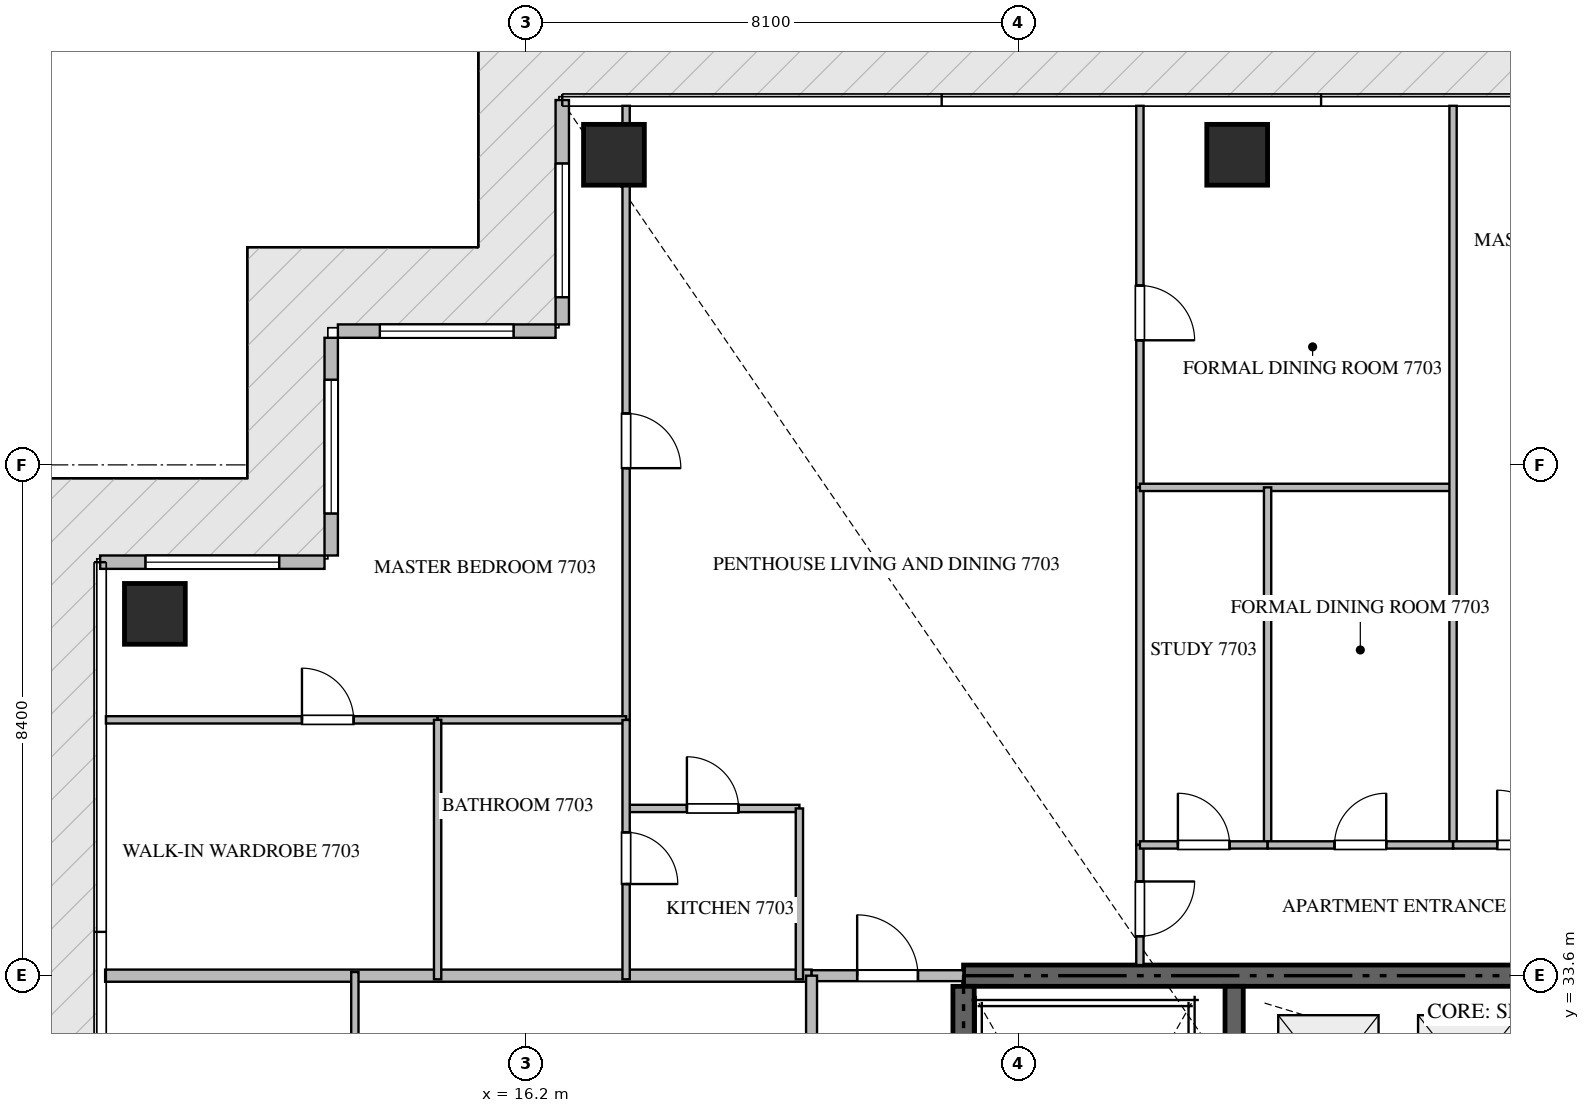
"""IFC4 building model, lengths in metres.
Left out: names, types, materials, properties, quantities, classifications, styles, units other than length and angle.
Written with IfcOpenShell. Run it as: python <this file> out.ifc"""

import sys

from ifc_helpers import new_model, si_unit, direction, frame, frame_2d, origin, origin_2d, place, context, subcontext, project, spatial, rectangle, extrude, source, transform, mapped, element, fill, save


model = new_model("IFC4")
c1 = context("Model", 3, precision=1e-05, world=origin(), true_north=direction((0.0, 1.0)))
c2 = subcontext(c1, "Body", "Model", "MODEL_VIEW")
j1 = project(units=[si_unit("LENGTHUNIT", "METRE"), si_unit("PLANEANGLEUNIT", "RADIAN")], contexts=[c1])
p1 = place(None, origin())
s1 = spatial("IfcSite", under=j1, at=p1, CompositionType="ELEMENT")
p2 = place(p1, origin())
s2 = spatial("IfcBuilding", under=s1, at=p2, CompositionType="ELEMENT")
p3 = place(p2, frame((0.0, 0.0, 309.65)))
s3 = spatial("IfcBuildingStorey", under=s2, at=p3, CompositionType="ELEMENT", Elevation=309.65)
p4 = place(p3, frame((41.4, 33.6, -0.26), z_axis=(0.0, 0.0, 1.0), x_axis=(-1.0, 0.0, 0.0)))
e1 = element("IfcWall", 1, at=p4, inside=s3, PredefinedType="SHEAR", context=c2, shape_type="SweptSolid", body=[
    extrude(rectangle(XDim=18.0, YDim=0.35, at=frame_2d((9.0, 0.0))), origin(), (0.0, 0.0, 1.0), 4.048),
])
p5 = place(p3, frame((23.4, 24.25, -0.26), z_axis=(0.0, 0.0, 1.0), x_axis=(0.0, 1.0, 0.0)))
e2 = element("IfcWall", 2, at=p5, inside=s3, PredefinedType="SHEAR", context=c2, shape_type="SweptSolid", body=[
    extrude(rectangle(XDim=9.175, YDim=0.35, at=frame_2d((4.587, 0.0))), origin(), (0.0, 0.0, 1.0), 4.048),
])
p6 = place(p3, frame((27.85, 23.55, -0.26), z_axis=(0.0, 0.0, 1.0), x_axis=(0.0, 1.0, 0.0)))
e3 = element("IfcWall", 3, at=p6, inside=s3, PredefinedType="SHEAR", context=c2, shape_type="SweptSolid", body=[
    extrude(rectangle(XDim=9.875, YDim=0.3, at=frame_2d((4.938, 0.0))), origin(), (0.0, 0.0, 1.0), 4.048),
])
m1 = source(origin(), c2, "Body", "SweptSolid", [
    extrude(rectangle(XDim=1.0, YDim=1.0, at=origin_2d()), origin(), (0.0, 0.0, 1.0), 4.05),
])
for number, where, z_axis, x_axis in (
    (4, (17.65, 47.1, -0.26), (0.0, 0.0, 1.0), (1.0, 0.0, 0.0)),
    (5, (27.9, 47.1, -0.26), (0.0, 0.0, 1.0), (1.0, 0.0, 0.0)),
    (6, (10.1, 39.55, -0.26), (0.0, 0.0, 1.0), (1.0, 0.0, 0.0)),
):
    element("IfcColumn", number, at=place(p3, frame(where, z_axis=z_axis, x_axis=x_axis)), inside=s3, PredefinedType="COLUMN", context=c2, shape_type="MappedRepresentation", body=[
        mapped(m1, transform((0.0, 0.0, 0.0), scale=1.0)),
    ])
p7 = place(p3, frame((16.8, 48.0, 0.0), z_axis=(0.0, 0.0, 1.0), x_axis=(0.0, -1.0, 0.0)))
e7 = element("IfcWall", 7, at=p7, inside=s3, PredefinedType="ELEMENTEDWALL", context=c2, shape_type="SweptSolid", body=[
    extrude(rectangle(XDim=3.69, YDim=0.22, at=frame_2d((1.845, 0.0))), origin(), (0.0, 0.0, 1.0), 3.775),
])
p8 = place(p7, frame((1.043, 0.0, 0.65)))
e8 = element("IfcOpeningElement", 8, at=p8, cuts=e7, PredefinedType="OPENING", context=c2, shape_type="SweptSolid", body=[
    extrude(rectangle(XDim=2.2, YDim=2.4, at=frame_2d((1.1, 1.2))), frame((0.0, 0.12, 0.0), z_axis=(0.0, -1.0, 0.0), x_axis=(1.0, 0.0, 0.0)), (0.0, 0.0, 1.0), 0.24),
])
p9 = place(p3, frame((16.69, 44.2, 0.0), z_axis=(0.0, 0.0, 1.0), x_axis=(-1.0, 0.0, 0.0)))
e9 = element("IfcWall", 9, at=p9, inside=s3, PredefinedType="ELEMENTEDWALL", context=c2, shape_type="SweptSolid", body=[
    extrude(rectangle(XDim=3.58, YDim=0.22, at=frame_2d((1.79, 0.0))), origin(), (0.0, 0.0, 1.0), 3.775),
])
p10 = place(p9, frame((0.69, 0.0, 0.65)))
e10 = element("IfcOpeningElement", 10, at=p10, cuts=e9, PredefinedType="OPENING", context=c2, shape_type="SweptSolid", body=[
    extrude(rectangle(XDim=2.2, YDim=2.4, at=frame_2d((1.1, 1.2))), frame((0.0, 0.12, 0.0), z_axis=(0.0, -1.0, 0.0), x_axis=(1.0, 0.0, 0.0)), (0.0, 0.0, 1.0), 0.24),
])
p11 = place(p3, frame((13.0, 44.09, 0.0), z_axis=(0.0, 0.0, 1.0), x_axis=(0.0, -1.0, 0.0)))
e11 = element("IfcWall", 11, at=p11, inside=s3, PredefinedType="ELEMENTEDWALL", context=c2, shape_type="SweptSolid", body=[
    extrude(rectangle(XDim=3.58, YDim=0.22, at=frame_2d((1.79, 0.0))), origin(), (0.0, 0.0, 1.0), 3.775),
])
p12 = place(p11, frame((0.69, 0.0, 0.65)))
e12 = element("IfcOpeningElement", 12, at=p12, cuts=e11, PredefinedType="OPENING", context=c2, shape_type="SweptSolid", body=[
    extrude(rectangle(XDim=2.2, YDim=2.4, at=frame_2d((1.1, 1.2))), frame((0.0, 0.12, 0.0), z_axis=(0.0, -1.0, 0.0), x_axis=(1.0, 0.0, 0.0)), (0.0, 0.0, 1.0), 0.24),
])
p13 = place(p3, frame((12.89, 40.4, 0.0), z_axis=(0.0, 0.0, 1.0), x_axis=(-1.0, 0.0, 0.0)))
e13 = element("IfcWall", 13, at=p13, inside=s3, PredefinedType="ELEMENTEDWALL", context=c2, shape_type="SweptSolid", body=[
    extrude(rectangle(XDim=3.69, YDim=0.22, at=frame_2d((1.845, 0.0))), origin(), (0.0, 0.0, 1.0), 3.775),
])
p14 = place(p13, frame((0.745, 0.0, 0.65)))
e14 = element("IfcOpeningElement", 14, at=p14, cuts=e13, PredefinedType="OPENING", context=c2, shape_type="SweptSolid", body=[
    extrude(rectangle(XDim=2.2, YDim=2.4, at=frame_2d((1.1, 1.2))), frame((0.0, 0.12, 0.0), z_axis=(0.0, -1.0, 0.0), x_axis=(1.0, 0.0, 0.0)), (0.0, 0.0, 1.0), 0.24),
])
p15 = place(p3, frame((9.282, 33.6, 0.0), z_axis=(0.0, 0.0, 1.0), x_axis=(1.0, 0.0, 0.0)))
e15 = element("IfcWall", 15, at=p15, inside=s3, PredefinedType="PARTITIONING", context=c2, shape_type="SweptSolid", body=[
    extrude(rectangle(XDim=11.618, YDim=0.2, at=frame_2d((5.809, 0.0))), origin(), (0.0, 0.0, 1.0), 3.79),
])
p16 = place(p3, frame((20.902, 33.6, 0.0), z_axis=(0.0, 0.0, 1.0), x_axis=(1.0, 0.0, 0.0)))
e16 = element("IfcWall", 16, at=p16, inside=s3, PredefinedType="PARTITIONING", context=c2, shape_type="SweptSolid", body=[
    extrude(rectangle(XDim=2.496, YDim=0.18, at=frame_2d((1.248, 0.0))), origin(), (0.0, 0.0, 1.0), 3.79),
])
p17 = place(p16, frame((0.748, 0.0, 0.0)))
e17 = element("IfcOpeningElement", 17, at=p17, cuts=e16, PredefinedType="OPENING", context=c2, shape_type="SweptSolid", body=[
    extrude(rectangle(XDim=1.0, YDim=2.15, at=frame_2d((0.5, 1.075))), frame((0.0, 0.1, 0.0), z_axis=(0.0, -1.0, 0.0), x_axis=(1.0, 0.0, 0.0)), (0.0, 0.0, 1.0), 0.2),
])
p18 = place(p3, frame((20.9, 16.8, 0.0), z_axis=(0.0, 0.0, 1.0), x_axis=(0.0, 1.0, 0.0)))
e18 = element("IfcWall", 18, at=p18, inside=s3, PredefinedType="PARTITIONING", context=c2, shape_type="SweptSolid", body=[
    extrude(rectangle(XDim=16.8, YDim=0.18, at=frame_2d((8.4, 0.0))), origin(), (0.0, 0.0, 1.0), 3.79),
])
p19 = place(p18, frame((1.3, 0.0, 0.0)))
e19 = element("IfcOpeningElement", 19, at=p19, cuts=e18, PredefinedType="OPENING", context=c2, shape_type="SweptSolid", body=[
    extrude(rectangle(XDim=1.0, YDim=2.15, at=frame_2d((0.5, 1.075))), frame((0.0, 0.1, 0.0), z_axis=(0.0, -1.0, 0.0), x_axis=(1.0, 0.0, 0.0)), (0.0, 0.0, 1.0), 0.2),
])
p20 = place(p3, frame((17.85, 36.35, 0.0), z_axis=(0.0, 0.0, 1.0), x_axis=(1.0, 0.0, 0.0)))
e20 = element("IfcWall", 20, at=p20, inside=s3, PredefinedType="PARTITIONING", context=c2, shape_type="SweptSolid", body=[
    extrude(rectangle(XDim=2.85, YDim=0.12, at=frame_2d((1.425, 0.0))), origin(), (0.0, 0.0, 1.0), 3.79),
])
p21 = place(p20, frame((1.0, 0.0, 0.0)))
e21 = element("IfcOpeningElement", 21, at=p21, cuts=e20, PredefinedType="OPENING", context=c2, shape_type="SweptSolid", body=[
    extrude(rectangle(XDim=0.85, YDim=2.1, at=frame_2d((0.425, 1.05))), frame((0.0, 0.07, 0.0), z_axis=(0.0, -1.0, 0.0), x_axis=(1.0, 0.0, 0.0)), (0.0, 0.0, 1.0), 0.14),
])
p22 = place(p3, frame((20.7, 36.35, 0.0), z_axis=(0.0, 0.0, 1.0), x_axis=(0.0, -1.0, 0.0)))
e22 = element("IfcWall", 22, at=p22, inside=s3, PredefinedType="PARTITIONING", context=c2, shape_type="SweptSolid", body=[
    extrude(rectangle(XDim=2.81, YDim=0.12, at=frame_2d((1.405, 0.0))), origin(), (0.0, 0.0, 1.0), 3.79),
])
p23 = place(p3, frame((17.85, 47.905, 0.0), z_axis=(0.0, 0.0, 1.0), x_axis=(0.0, -1.0, 0.0)))
e23 = element("IfcWall", 23, at=p23, inside=s3, PredefinedType="PARTITIONING", context=c2, shape_type="SweptSolid", body=[
    extrude(rectangle(XDim=10.098, YDim=0.12, at=frame_2d((5.049, 0.0))), origin(), (0.0, 0.0, 1.0), 3.292),
])
p24 = place(p23, frame((5.059, 0.0, 0.0)))
e24 = element("IfcOpeningElement", 24, at=p24, cuts=e23, PredefinedType="OPENING", context=c2, shape_type="SweptSolid", body=[
    extrude(rectangle(XDim=0.9, YDim=2.1, at=frame_2d((0.45, 1.05))), frame((0.0, 0.07, 0.0), z_axis=(0.0, -1.0, 0.0), x_axis=(1.0, 0.0, 0.0)), (0.0, 0.0, 1.0), 0.14),
])
p25 = place(p3, frame((9.295, 37.807, 0.0), z_axis=(0.0, 0.0, 1.0), x_axis=(1.0, 0.0, 0.0)))
e25 = element("IfcWall", 25, at=p25, inside=s3, PredefinedType="PARTITIONING", context=c2, shape_type="SweptSolid", body=[
    extrude(rectangle(XDim=5.455, YDim=0.12, at=frame_2d((2.728, 0.0))), origin(), (0.0, 0.0, 1.0), 3.79),
])
p26 = place(p25, frame((3.224, 0.0, 0.0)))
e26 = element("IfcOpeningElement", 26, at=p26, cuts=e25, PredefinedType="OPENING", context=c2, shape_type="SweptSolid", body=[
    extrude(rectangle(XDim=0.85, YDim=2.1, at=frame_2d((0.425, 1.05))), frame((0.0, 0.07, 0.0), z_axis=(0.0, -1.0, 0.0), x_axis=(1.0, 0.0, 0.0)), (0.0, 0.0, 1.0), 0.14),
])
p27 = place(p3, frame((14.752, 37.807, 0.0), z_axis=(0.0, 0.0, 1.0), x_axis=(1.0, 0.0, 0.0)))
e27 = element("IfcWall", 27, at=p27, inside=s3, PredefinedType="PARTITIONING", context=c2, shape_type="SweptSolid", body=[
    extrude(rectangle(XDim=3.098, YDim=0.12, at=frame_2d((1.549, 0.0))), origin(), (0.0, 0.0, 1.0), 3.79),
])
p28 = place(p3, frame((14.75, 37.807, 0.0), z_axis=(0.0, 0.0, 1.0), x_axis=(0.0, -1.0, 0.0)))
e28 = element("IfcWall", 28, at=p28, inside=s3, PredefinedType="PARTITIONING", context=c2, shape_type="SweptSolid", body=[
    extrude(rectangle(XDim=4.267, YDim=0.12, at=frame_2d((2.133, 0.0))), origin(), (0.0, 0.0, 1.0), 3.79),
])
p29 = place(p3, frame((17.85, 37.805, 0.0), z_axis=(0.0, 0.0, 1.0), x_axis=(0.0, -1.0, 0.0)))
e29 = element("IfcWall", 29, at=p29, inside=s3, PredefinedType="PARTITIONING", context=c2, shape_type="SweptSolid", body=[
    extrude(rectangle(XDim=4.265, YDim=0.12, at=frame_2d((2.132, 0.0))), origin(), (0.0, 0.0, 1.0), 3.372),
])
p30 = place(p29, frame((1.848, 0.0, 0.0)))
e30 = element("IfcOpeningElement", 30, at=p30, cuts=e29, PredefinedType="OPENING", context=c2, shape_type="SweptSolid", body=[
    extrude(rectangle(XDim=0.85, YDim=2.1, at=frame_2d((0.425, 1.05))), frame((0.0, 0.07, 0.0), z_axis=(0.0, -1.0, 0.0), x_axis=(1.0, 0.0, 0.0)), (0.0, 0.0, 1.0), 0.14),
])
p31 = place(p3, frame((26.3, 35.75, 0.0), z_axis=(0.0, 0.0, 1.0), x_axis=(0.0, -1.0, 0.0)))
e31 = element("IfcWall", 31, at=p31, inside=s3, PredefinedType="PARTITIONING", context=c2, shape_type="SweptSolid", body=[
    extrude(rectangle(XDim=1.975, YDim=0.12, at=frame_2d((0.988, 0.0))), origin(), (0.0, 0.0, 1.0), 3.79),
])
p32 = place(p31, frame((0.601, 0.0, 0.0)))
e32 = element("IfcOpeningElement", 32, at=p32, cuts=e31, PredefinedType="OPENING", context=c2, shape_type="SweptSolid", body=[
    extrude(rectangle(XDim=0.9, YDim=2.1, at=frame_2d((0.45, 1.05))), frame((0.0, 0.07, 0.0), z_axis=(0.0, -1.0, 0.0), x_axis=(1.0, 0.0, 0.0)), (0.0, 0.0, 1.0), 0.14),
])
p33 = place(p3, frame((26.3, 47.905, 0.0), z_axis=(0.0, 0.0, 1.0), x_axis=(0.0, -1.0, 0.0)))
e33 = element("IfcWall", 33, at=p33, inside=s3, PredefinedType="PARTITIONING", context=c2, shape_type="SweptSolid", body=[
    extrude(rectangle(XDim=6.275, YDim=0.12, at=frame_2d((3.138, 0.0))), origin(), (0.0, 0.0, 1.0), 3.79),
])
p34 = place(p33, frame((2.956, 0.0, 0.0)))
e34 = element("IfcOpeningElement", 34, at=p34, cuts=e33, PredefinedType="OPENING", context=c2, shape_type="SweptSolid", body=[
    extrude(rectangle(XDim=0.9, YDim=2.1, at=frame_2d((0.45, 1.05))), frame((0.0, 0.07, 0.0), z_axis=(0.0, -1.0, 0.0), x_axis=(1.0, 0.0, 0.0)), (0.0, 0.0, 1.0), 0.14),
])
p35 = place(p3, frame((26.3, 41.628, 0.0), z_axis=(0.0, 0.0, 1.0), x_axis=(0.0, -1.0, 0.0)))
e35 = element("IfcWall", 35, at=p35, inside=s3, PredefinedType="PARTITIONING", context=c2, shape_type="SweptSolid", body=[
    extrude(rectangle(XDim=5.876, YDim=0.12, at=frame_2d((2.938, 0.0))), origin(), (0.0, 0.0, 1.0), 3.79),
])
p36 = place(p3, frame((26.3, 41.63, 0.0), z_axis=(0.0, 0.0, 1.0), x_axis=(1.0, 0.0, 0.0)))
e36 = element("IfcWall", 36, at=p36, inside=s3, PredefinedType="PARTITIONING", context=c2, shape_type="SweptSolid", body=[
    extrude(rectangle(XDim=5.15, YDim=0.12, at=frame_2d((2.575, 0.0))), origin(), (0.0, 0.0, 1.0), 3.79),
])
p37 = place(p3, frame((31.45, 47.905, 0.0), z_axis=(0.0, 0.0, 1.0), x_axis=(0.0, -1.0, 0.0)))
e37 = element("IfcWall", 37, at=p37, inside=s3, PredefinedType="PARTITIONING", context=c2, shape_type="SweptSolid", body=[
    extrude(rectangle(XDim=12.155, YDim=0.12, at=frame_2d((6.078, 0.0))), origin(), (0.0, 0.0, 1.0), 3.79),
])
p38 = place(p3, frame((28.4, 41.63, 0.0), z_axis=(0.0, 0.0, 1.0), x_axis=(0.0, -1.0, 0.0)))
e38 = element("IfcWall", 38, at=p38, inside=s3, PredefinedType="PARTITIONING", context=c2, shape_type="SweptSolid", body=[
    extrude(rectangle(XDim=5.88, YDim=0.12, at=frame_2d((2.94, 0.0))), origin(), (0.0, 0.0, 1.0), 3.79),
])
p39 = place(p3, frame((26.3, 35.75, 0.0), z_axis=(0.0, 0.0, 1.0), x_axis=(1.0, 0.0, 0.0)))
e39 = element("IfcWall", 39, at=p39, inside=s3, PredefinedType="PARTITIONING", context=c2, shape_type="SweptSolid", body=[
    extrude(rectangle(XDim=2.1, YDim=0.12, at=frame_2d((1.05, 0.0))), origin(), (0.0, 0.0, 1.0), 3.79),
])
p40 = place(p39, frame((0.625, 0.0, 0.0)))
e40 = element("IfcOpeningElement", 40, at=p40, cuts=e39, PredefinedType="OPENING", context=c2, shape_type="SweptSolid", body=[
    extrude(rectangle(XDim=0.85, YDim=2.1, at=frame_2d((0.425, 1.05))), frame((0.0, 0.07, 0.0), z_axis=(0.0, -1.0, 0.0), x_axis=(1.0, 0.0, 0.0)), (0.0, 0.0, 1.0), 0.14),
])
p41 = place(p3, frame((28.402, 35.75, 0.0), z_axis=(0.0, 0.0, 1.0), x_axis=(1.0, 0.0, 0.0)))
e41 = element("IfcWall", 41, at=p41, inside=s3, PredefinedType="PARTITIONING", context=c2, shape_type="SweptSolid", body=[
    extrude(rectangle(XDim=3.048, YDim=0.12, at=frame_2d((1.524, 0.0))), origin(), (0.0, 0.0, 1.0), 3.79),
])
p42 = place(p41, frame((1.099, 0.0, 0.0)))
e42 = element("IfcOpeningElement", 42, at=p42, cuts=e41, PredefinedType="OPENING", context=c2, shape_type="SweptSolid", body=[
    extrude(rectangle(XDim=0.85, YDim=2.1, at=frame_2d((0.425, 1.05))), frame((0.0, 0.07, 0.0), z_axis=(0.0, -1.0, 0.0), x_axis=(1.0, 0.0, 0.0)), (0.0, 0.0, 1.0), 0.14),
])
p43 = place(p3, frame((31.452, 35.75, 0.0), z_axis=(0.0, 0.0, 1.0), x_axis=(1.0, 0.0, 0.0)))
e43 = element("IfcWall", 43, at=p43, inside=s3, PredefinedType="PARTITIONING", context=c2, shape_type="SweptSolid", body=[
    extrude(rectangle(XDim=2.348, YDim=0.12, at=frame_2d((1.174, 0.0))), origin(), (0.0, 0.0, 1.0), 3.79),
])
p44 = place(p43, frame((0.724, 0.0, 0.0)))
e44 = element("IfcOpeningElement", 44, at=p44, cuts=e43, PredefinedType="OPENING", context=c2, shape_type="SweptSolid", body=[
    extrude(rectangle(XDim=0.9, YDim=2.1, at=frame_2d((0.45, 1.05))), frame((0.0, 0.07, 0.0), z_axis=(0.0, -1.0, 0.0), x_axis=(1.0, 0.0, 0.0)), (0.0, 0.0, 1.0), 0.14),
])
p45 = place(p3, frame((13.389, 23.18, 0.0), z_axis=(0.0, 0.0, 1.0), x_axis=(0.0, 1.0, 0.0)))
e45 = element("IfcWall", 45, at=p45, inside=s3, PredefinedType="PARTITIONING", context=c2, shape_type="SweptSolid", body=[
    extrude(rectangle(XDim=10.48, YDim=0.12, at=frame_2d((5.24, 0.0))), origin(), (0.0, 0.0, 1.0), 3.79),
])
m2 = source(origin(), c2, "Body", "SweptSolid", [
    extrude(rectangle(XDim=2.2, YDim=2.4, at=frame_2d((1.1, 1.2))), frame((0.0, 0.03, 0.0), z_axis=(0.0, -1.0, 0.0), x_axis=(1.0, 0.0, 0.0)), (0.0, 0.0, 1.0), 0.06),
])
p46 = place(p8, origin())
e46 = element("IfcWindow", 46, at=p46, inside=s3, PartitioningType="SINGLE_PANEL", PredefinedType="WINDOW", context=c2, shape_type="MappedRepresentation", body=[
    mapped(m2, transform((0.0, 0.0, 0.0), scale=1.0)),
])
fill(e8, e46)
p47 = place(p10, origin())
e47 = element("IfcWindow", 47, at=p47, inside=s3, PartitioningType="SINGLE_PANEL", PredefinedType="WINDOW", context=c2, shape_type="MappedRepresentation", body=[
    mapped(m2, transform((0.0, 0.0, 0.0), scale=1.0)),
])
fill(e10, e47)
p48 = place(p12, origin())
e48 = element("IfcWindow", 48, at=p48, inside=s3, PartitioningType="SINGLE_PANEL", PredefinedType="WINDOW", context=c2, shape_type="MappedRepresentation", body=[
    mapped(m2, transform((0.0, 0.0, 0.0), scale=1.0)),
])
fill(e12, e48)
p49 = place(p14, origin())
e49 = element("IfcWindow", 49, at=p49, inside=s3, PartitioningType="SINGLE_PANEL", PredefinedType="WINDOW", context=c2, shape_type="MappedRepresentation", body=[
    mapped(m2, transform((0.0, 0.0, 0.0), scale=1.0)),
])
fill(e14, e49)
m3 = source(origin(), c2, "Body", "SweptSolid", [
    extrude(rectangle(XDim=1.0, YDim=2.15, at=frame_2d((0.5, 1.075))), frame((0.0, 0.025, 0.0), z_axis=(0.0, -1.0, 0.0), x_axis=(1.0, 0.0, 0.0)), (0.0, 0.0, 1.0), 0.05),
])
p50 = place(p17, origin())
e50 = element("IfcDoor", 50, at=p50, inside=s3, OperationType="SINGLE_SWING_LEFT", PredefinedType="DOOR", context=c2, shape_type="MappedRepresentation", body=[
    mapped(m3, transform((0.0, 0.0, 0.0), scale=1.0)),
])
fill(e17, e50)
m4 = source(origin(), c2, "Body", "SweptSolid", [
    extrude(rectangle(XDim=0.85, YDim=2.1, at=frame_2d((0.425, 1.05))), frame((0.0, 0.025, 0.0), z_axis=(0.0, -1.0, 0.0), x_axis=(1.0, 0.0, 0.0)), (0.0, 0.0, 1.0), 0.05),
])
p51 = place(p21, origin())
e51 = element("IfcDoor", 51, at=p51, inside=s3, OperationType="SINGLE_SWING_LEFT", PredefinedType="DOOR", context=c2, shape_type="MappedRepresentation", body=[
    mapped(m4, transform((0.0, 0.0, 0.0), scale=1.0)),
])
fill(e21, e51)
m5 = source(origin(), c2, "Body", "SweptSolid", [
    extrude(rectangle(XDim=0.9, YDim=2.1, at=frame_2d((0.45, 1.05))), frame((0.0, 0.025, 0.0), z_axis=(0.0, -1.0, 0.0), x_axis=(1.0, 0.0, 0.0)), (0.0, 0.0, 1.0), 0.05),
])
p52 = place(p24, origin())
e52 = element("IfcDoor", 52, at=p52, inside=s3, OperationType="SINGLE_SWING_RIGHT", PredefinedType="DOOR", context=c2, shape_type="MappedRepresentation", body=[
    mapped(m5, transform((0.0, 0.0, 0.0), scale=1.0)),
])
fill(e24, e52)
p53 = place(p26, origin())
e53 = element("IfcDoor", 53, at=p53, inside=s3, OperationType="SINGLE_SWING_LEFT", PredefinedType="DOOR", context=c2, shape_type="MappedRepresentation", body=[
    mapped(m4, transform((0.0, 0.0, 0.0), scale=1.0)),
])
fill(e26, e53)
p54 = place(p30, origin())
e54 = element("IfcDoor", 54, at=p54, inside=s3, OperationType="SINGLE_SWING_RIGHT", PredefinedType="DOOR", context=c2, shape_type="MappedRepresentation", body=[
    mapped(m4, transform((0.0, 0.0, 0.0), scale=1.0)),
])
fill(e30, e54)
p55 = place(p32, origin())
e55 = element("IfcDoor", 55, at=p55, inside=s3, OperationType="SINGLE_SWING_LEFT", PredefinedType="DOOR", context=c2, shape_type="MappedRepresentation", body=[
    mapped(m5, transform((0.0, 0.0, 0.0), scale=1.0)),
])
fill(e32, e55)
p56 = place(p34, origin())
e56 = element("IfcDoor", 56, at=p56, inside=s3, OperationType="SINGLE_SWING_RIGHT", PredefinedType="DOOR", context=c2, shape_type="MappedRepresentation", body=[
    mapped(m5, transform((0.0, 0.0, 0.0), scale=1.0)),
])
fill(e34, e56)
p57 = place(p40, origin())
e57 = element("IfcDoor", 57, at=p57, inside=s3, OperationType="SINGLE_SWING_LEFT", PredefinedType="DOOR", context=c2, shape_type="MappedRepresentation", body=[
    mapped(m4, transform((0.0, 0.0, 0.0), scale=1.0)),
])
fill(e40, e57)
p58 = place(p42, origin())
e58 = element("IfcDoor", 58, at=p58, inside=s3, OperationType="SINGLE_SWING_RIGHT", PredefinedType="DOOR", context=c2, shape_type="MappedRepresentation", body=[
    mapped(m4, transform((0.0, 0.0, 0.0), scale=1.0)),
])
fill(e42, e58)
p59 = place(p44, origin())
e59 = element("IfcDoor", 59, at=p59, inside=s3, OperationType="SINGLE_SWING_LEFT", PredefinedType="DOOR", context=c2, shape_type="MappedRepresentation", body=[
    mapped(m5, transform((0.0, 0.0, 0.0), scale=1.0)),
])
fill(e44, e59)
save(model, sys.argv[1])
